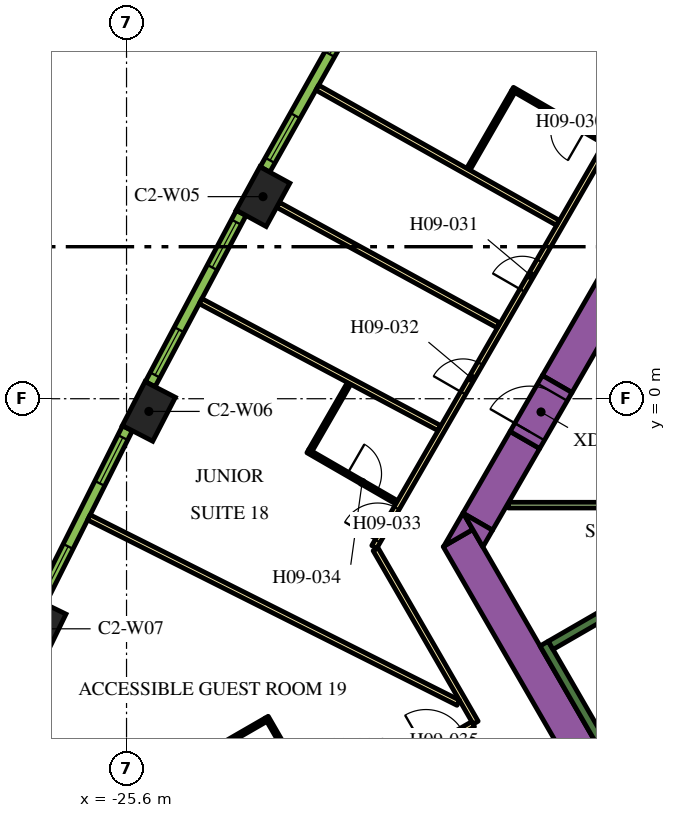
"""IFC4 building model, lengths in metres.
Left out: names, types, materials, properties, quantities, classifications, styles, units other than length and angle.
Written with IfcOpenShell. Run it as: python <this file> out.ifc"""

import sys

from ifc_helpers import new_model, si_unit, direction, frame, frame_2d, origin, origin_2d, place, context, subcontext, project, spatial, polyline, rectangle, outline, extrude, element, fill, save


model = new_model("IFC4")
c1 = context("Model", 3, precision=1e-05, world=origin(), true_north=direction((0.0, 1.0)))
c2 = subcontext(c1, "Body", "Model", "MODEL_VIEW")
j1 = project(units=[si_unit("LENGTHUNIT", "METRE"), si_unit("PLANEANGLEUNIT", "RADIAN")], contexts=[c1])
p1 = place(None, origin())
s1 = spatial("IfcSite", under=j1, at=p1, CompositionType="ELEMENT")
p2 = place(p1, origin())
s2 = spatial("IfcBuilding", under=s1, at=p2, CompositionType="ELEMENT")
p3 = place(p2, frame((0.0, 0.0, 126.6)))
s3 = spatial("IfcBuildingStorey", under=s2, at=p3, CompositionType="ELEMENT", Elevation=126.6)
for number, where, z_axis, x_axis in (
    (1, (-22.009, 5.317, 0.0), (0.0, 0.0, 1.0), (-0.48, -0.877, 0.0)),
    (2, (-25.012, -0.334, 0.0), (0.0, 0.0, 1.0), (-0.459, -0.888, 0.0)),
    (3, (-27.883, -6.054, 0.0), (0.0, 0.0, 1.0), (-0.438, -0.899, 0.0)),
):
    element("IfcColumn", number, at=place(p3, frame(where, z_axis=z_axis, x_axis=x_axis)), inside=s3, PredefinedType="COLUMN", context=c2, shape_type="SweptSolid", body=[
        extrude(rectangle(XDim=1.3, YDim=0.9, at=origin_2d()), origin(), (0.0, 0.0, 1.0), 3.9),
    ])
p4 = place(p3, frame((-14.268, 0.387, 0.0), z_axis=(0.0, 0.0, 1.0), x_axis=(0.499994617707, 0.866028511231, 0.0)))
e4 = element("IfcWall", 4, at=p4, inside=s3, PredefinedType="SOLIDWALL", context=c2, shape_type="SweptSolid", body=[
    extrude(rectangle(XDim=18.817, YDim=0.9, at=frame_2d((9.409, 0.0))), origin(), (0.0, 0.0, 1.0), 3.9),
])
p5 = place(p3, frame((-12.134, -11.883, 0.0), z_axis=(0.0, 0.0, 1.0), x_axis=(-0.500005339912, 0.866022320763, 0.0)))
e5 = element("IfcWall", 5, at=p5, inside=s3, PredefinedType="SOLIDWALL", context=c2, shape_type="SweptSolid", body=[
    extrude(rectangle(XDim=9.488, YDim=0.9, at=frame_2d((4.744, 0.0))), origin(), (0.0, 0.0, 1.0), 3.9),
])
p6 = place(p3, origin())
e6 = element("IfcWall", 6, at=p6, inside=s3, PredefinedType="SOLIDWALL", context=c2, shape_type="SweptSolid", body=[
    extrude(outline(polyline([(-16.489, -3.44), (-17.251, -3.88), (-16.743, -3.0), (-16.489, -3.44)])), origin(), (0.0, 0.0, 1.0), 3.9),
])
p7 = place(p3, frame((-15.118, -1.085, 0.0), z_axis=(0.0, 0.0, 1.0), x_axis=(-0.50006606081, -0.865987260198, 0.0)))
e7 = element("IfcWall", 7, at=p7, inside=s3, PredefinedType="SOLIDWALL", context=c2, shape_type="SweptSolid", body=[
    extrude(rectangle(XDim=2.481, YDim=0.9, at=frame_2d((1.24, 0.0))), origin(), (0.0, 0.0, 1.0), 3.9),
])
e8 = element("IfcWall", 8, at=p6, inside=s3, PredefinedType="SOLIDWALL", context=c2, shape_type="SweptSolid", body=[
    extrude(outline(polyline([(-16.223, -3.9), (-16.732, -3.02), (-15.969, -3.46), (-16.223, -3.9)])), origin(), (0.0, 0.0, 1.0), 3.9),
])
p8 = place(p3, frame((-12.885, -9.431, 0.0), z_axis=(0.0, 0.0, 1.0), x_axis=(-0.500020560727, 0.866013532718, 0.0)))
e9 = element("IfcWall", 9, at=p8, inside=s3, PredefinedType="SOLIDWALL", context=c2, shape_type="SweptSolid", body=[
    extrude(rectangle(XDim=3.45, YDim=0.25, at=frame_2d((1.725, 0.0))), origin(), (0.0, 0.0, 1.0), 3.9),
])
p9 = place(p3, frame((-14.44, -6.49, 0.0), z_axis=(0.0, 0.0, 1.0), x_axis=(0.866022966069, 0.500004222222, 0.0)))
e10 = element("IfcWall", 10, at=p9, inside=s3, PredefinedType="SOLIDWALL", context=c2, shape_type="SweptSolid", body=[
    extrude(rectangle(XDim=6.8, YDim=0.25, at=frame_2d((3.4, 0.0))), origin(), (0.0, 0.0, 1.0), 3.9),
])
p10 = place(p3, frame((-12.915, -2.8, 0.0), z_axis=(0.0, 0.0, 1.0), x_axis=(-1.0, 0.0, 0.0)))
e11 = element("IfcWall", 11, at=p10, inside=s3, PredefinedType="PARTITIONING", context=c2, shape_type="SweptSolid", body=[
    extrude(rectangle(XDim=2.637, YDim=0.15, at=frame_2d((1.318, 0.0))), origin(), (0.0, 0.0, 1.0), 2.75),
])
p11 = place(p3, frame((-15.118, -1.085, 0.0), z_axis=(0.0, 0.0, 1.0), x_axis=(0.500000056704, 0.866025371046, 0.0)))
e12 = element("IfcWall", 12, at=p11, inside=s3, PredefinedType="SOLIDWALL", context=c2, shape_type="SweptSolid", body=[
    extrude(rectangle(XDim=1.7, YDim=0.9, at=frame_2d((0.85, 0.0))), origin(), (0.0, 0.0, 1.0), 3.9),
])
p12 = place(p11, frame((0.25, 0.0, 0.0)))
e13 = element("IfcOpeningElement", 13, at=p12, cuts=e12, PredefinedType="OPENING", context=c2, shape_type="SweptSolid", body=[
    extrude(rectangle(XDim=1.2, YDim=2.1, at=frame_2d((0.6, 1.05))), frame((0.0, 0.46, 0.0), z_axis=(0.0, -1.0, 0.0), x_axis=(1.0, 0.0, 0.0)), (0.0, 0.0, 1.0), 0.92),
])
p13 = place(p3, frame((-19.081, -3.9, 0.0), z_axis=(0.0, 0.0, 1.0), x_axis=(0.499998313975, 0.866026377209, 0.0)))
e14 = element("IfcWall", 14, at=p13, inside=s3, PredefinedType="PARTITIONING", context=c2, shape_type="SweptSolid", body=[
    extrude(rectangle(XDim=25.766, YDim=0.15, at=frame_2d((12.883, 0.0))), origin(), (0.0, 0.0, 1.0), 2.75),
])
p14 = place(p13, frame((19.306, 0.0, 0.0)))
e15 = element("IfcOpeningElement", 15, at=p14, cuts=e14, PredefinedType="OPENING", context=c2, shape_type="SweptSolid", body=[
    extrude(rectangle(XDim=1.0, YDim=2.1, at=frame_2d((0.5, 1.05))), frame((0.0, 0.085, 0.0), z_axis=(0.0, -1.0, 0.0), x_axis=(1.0, 0.0, 0.0)), (0.0, 0.0, 1.0), 0.17),
])
p15 = place(p13, frame((18.0, 0.0, 0.0)))
e16 = element("IfcOpeningElement", 16, at=p15, cuts=e14, PredefinedType="OPENING", context=c2, shape_type="SweptSolid", body=[
    extrude(rectangle(XDim=1.0, YDim=2.1, at=frame_2d((0.5, 1.05))), frame((0.0, 0.085, 0.0), z_axis=(0.0, -1.0, 0.0), x_axis=(1.0, 0.0, 0.0)), (0.0, 0.0, 1.0), 0.17),
])
p16 = place(p13, frame((7.793, 0.0, 0.0)))
e17 = element("IfcOpeningElement", 17, at=p16, cuts=e14, PredefinedType="OPENING", context=c2, shape_type="SweptSolid", body=[
    extrude(rectangle(XDim=0.9, YDim=2.1, at=frame_2d((0.45, 1.05))), frame((0.0, 0.085, 0.0), z_axis=(0.0, -1.0, 0.0), x_axis=(1.0, 0.0, 0.0)), (0.0, 0.0, 1.0), 0.17),
])
p17 = place(p13, frame((4.674, 0.0, 0.0)))
e18 = element("IfcOpeningElement", 18, at=p17, cuts=e14, PredefinedType="OPENING", context=c2, shape_type="SweptSolid", body=[
    extrude(rectangle(XDim=0.9, YDim=2.1, at=frame_2d((0.45, 1.05))), frame((0.0, 0.085, 0.0), z_axis=(0.0, -1.0, 0.0), x_axis=(1.0, 0.0, 0.0)), (0.0, 0.0, 1.0), 0.17),
])
p18 = place(p13, frame((0.18, 0.0, 0.0)))
e19 = element("IfcOpeningElement", 19, at=p18, cuts=e14, PredefinedType="OPENING", context=c2, shape_type="SweptSolid", body=[
    extrude(rectangle(XDim=1.0, YDim=2.1, at=frame_2d((0.5, 1.05))), frame((0.0, 0.085, 0.0), z_axis=(0.0, -1.0, 0.0), x_axis=(1.0, 0.0, 0.0)), (0.0, 0.0, 1.0), 0.17),
])
p19 = place(p3, frame((-16.412, -8.523, 0.0), z_axis=(0.0, 0.0, 1.0), x_axis=(-0.500001929737, 0.866024289647, 0.0)))
e20 = element("IfcWall", 20, at=p19, inside=s3, PredefinedType="PARTITIONING", context=c2, shape_type="SweptSolid", body=[
    extrude(rectangle(XDim=5.268, YDim=0.15, at=frame_2d((2.634, 0.0))), origin(), (0.0, 0.0, 1.0), 2.75),
])
p20 = place(p3, frame((-28.211, -15.335, 0.0), z_axis=(0.0, 0.0, 1.0), x_axis=(0.866025884867, 0.49999916674, 0.0)))
e21 = element("IfcWall", 21, at=p20, inside=s3, PredefinedType="PARTITIONING", context=c2, shape_type="SweptSolid", body=[
    extrude(rectangle(XDim=13.543, YDim=0.15, at=frame_2d((6.772, 0.0))), origin(), (0.0, 0.0, 1.0), 2.75),
])
p21 = place(p20, frame((12.114, 0.0, 0.0)))
e22 = element("IfcOpeningElement", 22, at=p21, cuts=e21, PredefinedType="OPENING", context=c2, shape_type="SweptSolid", body=[
    extrude(rectangle(XDim=1.1, YDim=2.1, at=frame_2d((0.55, 1.05))), frame((0.0, 0.085, 0.0), z_axis=(0.0, -1.0, 0.0), x_axis=(1.0, 0.0, 0.0)), (0.0, 0.0, 1.0), 0.17),
])
p22 = place(p20, frame((4.65, 0.0, 0.0)))
e23 = element("IfcOpeningElement", 23, at=p22, cuts=e21, PredefinedType="OPENING", context=c2, shape_type="SweptSolid", body=[
    extrude(rectangle(XDim=1.0, YDim=2.1, at=frame_2d((0.5, 1.05))), frame((0.0, 0.085, 0.0), z_axis=(0.0, -1.0, 0.0), x_axis=(1.0, 0.0, 0.0)), (0.0, 0.0, 1.0), 0.17),
])
p23 = place(p3, frame((-29.406, -8.901, 0.0), z_axis=(0.0, 0.0, 1.0), x_axis=(0.904002363742, -0.427527456836, 0.0)))
e24 = element("IfcWall", 24, at=p23, inside=s3, PredefinedType="PARTITIONING", context=c2, shape_type="SweptSolid", body=[
    extrude(rectangle(XDim=7.362, YDim=0.15, at=frame_2d((3.681, 0.0))), origin(), (0.0, 0.0, 1.0), 2.75),
])
p24 = place(p3, frame((-23.652, 2.567, 0.0), z_axis=(0.0, 0.0, 1.0), x_axis=(0.883019237957, -0.469336793144, 0.0)))
e25 = element("IfcWall", 25, at=p24, inside=s3, PredefinedType="PARTITIONING", context=c2, shape_type="SweptSolid", body=[
    extrude(rectangle(XDim=7.111, YDim=0.15, at=frame_2d((3.555, 0.0))), origin(), (0.0, 0.0, 1.0), 2.75),
])
p25 = place(p3, frame((-26.591, -3.122, 0.0), z_axis=(0.0, 0.0, 1.0), x_axis=(0.893766213273, -0.448533115847, 0.0)))
e26 = element("IfcWall", 26, at=p25, inside=s3, PredefinedType="PARTITIONING", context=c2, shape_type="SweptSolid", body=[
    extrude(rectangle(XDim=10.875, YDim=0.15, at=frame_2d((5.438, 0.0))), origin(), (0.0, 0.0, 1.0), 2.75),
])
p26 = place(p3, frame((-21.614, 5.102, 0.0), z_axis=(0.0, 0.0, 1.0), x_axis=(0.877484555087, -0.479604895287, 0.0)))
e27 = element("IfcWall", 27, at=p26, inside=s3, PredefinedType="PARTITIONING", context=c2, shape_type="SweptSolid", body=[
    extrude(rectangle(XDim=6.611, YDim=0.15, at=frame_2d((3.306, 0.0))), origin(), (0.0, 0.0, 1.0), 2.75),
])
p27 = place(p3, frame((-20.581, 8.185, 0.0), z_axis=(0.0, 0.0, 1.0), x_axis=(0.871820720803, -0.489825102233, 0.0)))
e28 = element("IfcWall", 28, at=p27, inside=s3, PredefinedType="PARTITIONING", context=c2, shape_type="SweptSolid", body=[
    extrude(rectangle(XDim=7.257, YDim=0.15, at=frame_2d((3.628, 0.0))), origin(), (0.0, 0.0, 1.0), 2.75),
])
p28 = place(p3, frame((-13.019, 6.751, 0.0), z_axis=(0.0, 0.0, 1.0), x_axis=(-0.866034573852, 0.49998411664, 0.0)))
e29 = element("IfcWall", 29, at=p28, inside=s3, PredefinedType="PARTITIONING", context=c2, shape_type="SweptSolid", body=[
    extrude(rectangle(XDim=2.8, YDim=0.1, at=frame_2d((1.4, 0.0))), origin(), (0.0, 0.0, 1.0), 2.75),
])
p29 = place(p28, frame((0.6, 0.0, 0.0)))
e30 = element("IfcOpeningElement", 30, at=p29, cuts=e29, PredefinedType="OPENING", context=c2, shape_type="SweptSolid", body=[
    extrude(rectangle(XDim=0.9, YDim=2.1, at=frame_2d((0.45, 1.05))), frame((0.0, 0.06, 0.0), z_axis=(0.0, -1.0, 0.0), x_axis=(1.0, 0.0, 0.0)), (0.0, 0.0, 1.0), 0.12),
])
p30 = place(p3, frame((-15.425, 8.083, 0.0), z_axis=(0.0, 0.0, 1.0), x_axis=(-0.500032858622, -0.866006432019, 0.0)))
e31 = element("IfcWall", 31, at=p30, inside=s3, PredefinedType="PARTITIONING", context=c2, shape_type="SweptSolid", body=[
    extrude(rectangle(XDim=2.36, YDim=0.1, at=frame_2d((1.18, 0.0))), origin(), (0.0, 0.0, 1.0), 2.75),
])
p31 = place(p3, frame((-20.829, -1.377, 0.0), z_axis=(0.0, 0.0, 1.0), x_axis=(0.866036505625, -0.499980770555, 0.0)))
e32 = element("IfcWall", 32, at=p31, inside=s3, PredefinedType="PARTITIONING", context=c2, shape_type="SweptSolid", body=[
    extrude(rectangle(XDim=2.7, YDim=0.1, at=frame_2d((1.35, 0.0))), origin(), (0.0, 0.0, 1.0), 2.75),
])
p32 = place(p31, frame((1.2, 0.0, 0.0)))
e33 = element("IfcOpeningElement", 33, at=p32, cuts=e32, PredefinedType="OPENING", context=c2, shape_type="SweptSolid", body=[
    extrude(rectangle(XDim=0.9, YDim=2.1, at=frame_2d((0.45, 1.05))), frame((0.0, 0.06, 0.0), z_axis=(0.0, -1.0, 0.0), x_axis=(1.0, 0.0, 0.0)), (0.0, 0.0, 1.0), 0.12),
])
p33 = place(p3, frame((-20.761, -1.359, 0.0), z_axis=(0.0, 0.0, 1.0), x_axis=(0.499954962928, 0.866051404389, 0.0)))
e34 = element("IfcWall", 34, at=p33, inside=s3, PredefinedType="PARTITIONING", context=c2, shape_type="SweptSolid", body=[
    extrude(rectangle(XDim=2.03, YDim=0.1, at=frame_2d((1.015, 0.0))), origin(), (0.0, 0.0, 1.0), 2.75),
])
p34 = place(p3, frame((-20.515, -10.805, 0.0), z_axis=(0.0, 0.0, 1.0), x_axis=(-0.49994636267, 0.866056369097, 0.0)))
e35 = element("IfcWall", 35, at=p34, inside=s3, PredefinedType="PARTITIONING", context=c2, shape_type="SweptSolid", body=[
    extrude(rectangle(XDim=2.8, YDim=0.1, at=frame_2d((1.4, 0.0))), origin(), (0.0, 0.0, 1.0), 2.75),
])
p35 = place(p34, frame((0.55, 0.0, 0.0)))
e36 = element("IfcOpeningElement", 36, at=p35, cuts=e35, PredefinedType="OPENING", context=c2, shape_type="SweptSolid", body=[
    extrude(rectangle(XDim=1.0, YDim=2.1, at=frame_2d((0.5, 1.05))), frame((0.0, 0.06, 0.0), z_axis=(0.0, -1.0, 0.0), x_axis=(1.0, 0.0, 0.0)), (0.0, 0.0, 1.0), 0.12),
])
p36 = place(p3, frame((-21.933, -8.448, 0.0), z_axis=(0.0, 0.0, 1.0), x_axis=(-0.866022959057, -0.500004234368, 0.0)))
e37 = element("IfcWall", 37, at=p36, inside=s3, PredefinedType="PARTITIONING", context=c2, shape_type="SweptSolid", body=[
    extrude(rectangle(XDim=2.5, YDim=0.1, at=frame_2d((1.25, 0.0))), origin(), (0.0, 0.0, 1.0), 2.75),
])
p37 = place(p3, frame((-19.458, 10.48, 0.0), z_axis=(0.0, 0.0, 1.0), x_axis=(-0.48983164787, -0.87181704316, 0.0)))
e38 = element("IfcWall", 38, at=p37, inside=s3, PredefinedType="SOLIDWALL", context=c2, shape_type="SweptSolid", body=[
    extrude(rectangle(XDim=5.1, YDim=0.29, at=frame_2d((2.55, 0.0))), origin(), (0.0, 0.0, 1.0), 3.65),
])
p38 = place(p37, frame((0.272, 0.0, 0.9)))
e39 = element("IfcOpeningElement", 39, at=p38, cuts=e38, PredefinedType="OPENING", context=c2, shape_type="SweptSolid", body=[
    extrude(rectangle(XDim=1.35, YDim=2.15, at=frame_2d((0.675, 1.075))), frame((0.0, 0.155, 0.0), z_axis=(0.0, -1.0, 0.0), x_axis=(1.0, 0.0, 0.0)), (0.0, 0.0, 1.0), 0.31),
])
p39 = place(p37, frame((3.478, 0.0, 0.9)))
e40 = element("IfcOpeningElement", 40, at=p39, cuts=e38, PredefinedType="OPENING", context=c2, shape_type="SweptSolid", body=[
    extrude(rectangle(XDim=1.35, YDim=2.15, at=frame_2d((0.675, 1.075))), frame((0.0, 0.155, 0.0), z_axis=(0.0, -1.0, 0.0), x_axis=(1.0, 0.0, 0.0)), (0.0, 0.0, 1.0), 0.31),
])
p40 = place(p3, frame((-22.583, 4.887, 0.0), z_axis=(0.0, 0.0, 1.0), x_axis=(-0.469323203119, -0.883026461106, 0.0)))
e41 = element("IfcWall", 41, at=p40, inside=s3, PredefinedType="SOLIDWALL", context=c2, shape_type="SweptSolid", body=[
    extrude(rectangle(XDim=5.101, YDim=0.29, at=frame_2d((2.55, 0.0))), origin(), (0.0, 0.0, 1.0), 3.65),
])
p41 = place(p40, frame((0.273, 0.0, 0.9)))
e42 = element("IfcOpeningElement", 42, at=p41, cuts=e41, PredefinedType="OPENING", context=c2, shape_type="SweptSolid", body=[
    extrude(rectangle(XDim=1.35, YDim=2.15, at=frame_2d((0.675, 1.075))), frame((0.0, 0.155, 0.0), z_axis=(0.0, -1.0, 0.0), x_axis=(1.0, 0.0, 0.0)), (0.0, 0.0, 1.0), 0.31),
])
p42 = place(p40, frame((3.478, 0.0, 0.9)))
e43 = element("IfcOpeningElement", 43, at=p42, cuts=e41, PredefinedType="OPENING", context=c2, shape_type="SweptSolid", body=[
    extrude(rectangle(XDim=1.35, YDim=2.15, at=frame_2d((0.675, 1.075))), frame((0.0, 0.155, 0.0), z_axis=(0.0, -1.0, 0.0), x_axis=(1.0, 0.0, 0.0)), (0.0, 0.0, 1.0), 0.31),
])
p43 = place(p3, frame((-25.576, -0.778, 0.0), z_axis=(0.0, 0.0, 1.0), x_axis=(-0.448534297211, -0.893765620409, 0.0)))
e44 = element("IfcWall", 44, at=p43, inside=s3, PredefinedType="SOLIDWALL", context=c2, shape_type="SweptSolid", body=[
    extrude(rectangle(XDim=5.1, YDim=0.29, at=frame_2d((2.55, 0.0))), origin(), (0.0, 0.0, 1.0), 3.65),
])
p44 = place(p43, frame((0.272, 0.0, 0.9)))
e45 = element("IfcOpeningElement", 45, at=p44, cuts=e44, PredefinedType="OPENING", context=c2, shape_type="SweptSolid", body=[
    extrude(rectangle(XDim=1.35, YDim=2.15, at=frame_2d((0.675, 1.075))), frame((0.0, 0.155, 0.0), z_axis=(0.0, -1.0, 0.0), x_axis=(1.0, 0.0, 0.0)), (0.0, 0.0, 1.0), 0.31),
])
p45 = place(p43, frame((3.478, 0.0, 0.9)))
e46 = element("IfcOpeningElement", 46, at=p45, cuts=e44, PredefinedType="OPENING", context=c2, shape_type="SweptSolid", body=[
    extrude(rectangle(XDim=1.35, YDim=2.15, at=frame_2d((0.675, 1.075))), frame((0.0, 0.155, 0.0), z_axis=(0.0, -1.0, 0.0), x_axis=(1.0, 0.0, 0.0)), (0.0, 0.0, 1.0), 0.31),
])
p46 = place(p12, origin())
e47 = element("IfcDoor", 47, at=p46, inside=s3, OperationType="SINGLE_SWING_LEFT", PredefinedType="DOOR", context=c2, shape_type="SweptSolid", body=[
    extrude(rectangle(XDim=1.2, YDim=2.1, at=frame_2d((0.6, 1.05))), frame((0.0, 0.025, 0.0), z_axis=(0.0, -1.0, 0.0), x_axis=(1.0, 0.0, 0.0)), (0.0, 0.0, 1.0), 0.05),
])
fill(e13, e47)
p47 = place(p29, origin())
e48 = element("IfcDoor", 48, at=p47, inside=s3, OperationType="SINGLE_SWING_RIGHT", PredefinedType="DOOR", context=c2, shape_type="SweptSolid", body=[
    extrude(rectangle(XDim=0.9, YDim=2.1, at=frame_2d((0.45, 1.05))), frame((0.0, 0.025, 0.0), z_axis=(0.0, -1.0, 0.0), x_axis=(1.0, 0.0, 0.0)), (0.0, 0.0, 1.0), 0.05),
])
fill(e30, e48)
p48 = place(p16, origin())
e49 = element("IfcDoor", 49, at=p48, inside=s3, OperationType="SINGLE_SWING_RIGHT", PredefinedType="DOOR", context=c2, shape_type="SweptSolid", body=[
    extrude(rectangle(XDim=0.9, YDim=2.1, at=frame_2d((0.45, 1.05))), frame((0.0, 0.025, 0.0), z_axis=(0.0, -1.0, 0.0), x_axis=(1.0, 0.0, 0.0)), (0.0, 0.0, 1.0), 0.05),
])
fill(e17, e49)
p49 = place(p17, origin())
e50 = element("IfcDoor", 50, at=p49, inside=s3, OperationType="SINGLE_SWING_LEFT", PredefinedType="DOOR", context=c2, shape_type="SweptSolid", body=[
    extrude(rectangle(XDim=0.9, YDim=2.1, at=frame_2d((0.45, 1.05))), frame((0.0, 0.025, 0.0), z_axis=(0.0, -1.0, 0.0), x_axis=(1.0, 0.0, 0.0)), (0.0, 0.0, 1.0), 0.05),
])
fill(e18, e50)
p50 = place(p18, origin())
e51 = element("IfcDoor", 51, at=p50, inside=s3, OperationType="SINGLE_SWING_LEFT", PredefinedType="DOOR", context=c2, shape_type="SweptSolid", body=[
    extrude(rectangle(XDim=1.0, YDim=2.1, at=frame_2d((0.5, 1.05))), frame((0.0, 0.025, 0.0), z_axis=(0.0, -1.0, 0.0), x_axis=(1.0, 0.0, 0.0)), (0.0, 0.0, 1.0), 0.05),
])
fill(e19, e51)
p51 = place(p32, origin())
e52 = element("IfcDoor", 52, at=p51, inside=s3, OperationType="SINGLE_SWING_RIGHT", PredefinedType="DOOR", context=c2, shape_type="SweptSolid", body=[
    extrude(rectangle(XDim=0.9, YDim=2.1, at=frame_2d((0.45, 1.05))), frame((0.0, 0.025, 0.0), z_axis=(0.0, -1.0, 0.0), x_axis=(1.0, 0.0, 0.0)), (0.0, 0.0, 1.0), 0.05),
])
fill(e33, e52)
p52 = place(p21, origin())
e53 = element("IfcDoor", 53, at=p52, inside=s3, OperationType="SINGLE_SWING_RIGHT", PredefinedType="DOOR", context=c2, shape_type="SweptSolid", body=[
    extrude(rectangle(XDim=1.1, YDim=2.1, at=frame_2d((0.55, 1.05))), frame((0.0, 0.025, 0.0), z_axis=(0.0, -1.0, 0.0), x_axis=(1.0, 0.0, 0.0)), (0.0, 0.0, 1.0), 0.05),
])
fill(e22, e53)
p53 = place(p38, origin())
e54 = element("IfcWindow", 54, at=p53, inside=s3, PartitioningType="DOUBLE_PANEL_VERTICAL", PredefinedType="WINDOW", context=c2, shape_type="SweptSolid", body=[
    extrude(rectangle(XDim=1.35, YDim=2.15, at=frame_2d((0.675, 1.075))), frame((0.0, 0.015, 0.0), z_axis=(0.0, -1.0, 0.0), x_axis=(1.0, 0.0, 0.0)), (0.0, 0.0, 1.0), 0.06),
])
fill(e39, e54)
p54 = place(p39, origin())
e55 = element("IfcWindow", 55, at=p54, inside=s3, PartitioningType="DOUBLE_PANEL_VERTICAL", PredefinedType="WINDOW", context=c2, shape_type="SweptSolid", body=[
    extrude(rectangle(XDim=1.35, YDim=2.15, at=frame_2d((0.675, 1.075))), frame((0.0, 0.015, 0.0), z_axis=(0.0, -1.0, 0.0), x_axis=(1.0, 0.0, 0.0)), (0.0, 0.0, 1.0), 0.06),
])
fill(e40, e55)
p55 = place(p41, origin())
e56 = element("IfcWindow", 56, at=p55, inside=s3, PartitioningType="DOUBLE_PANEL_VERTICAL", PredefinedType="WINDOW", context=c2, shape_type="SweptSolid", body=[
    extrude(rectangle(XDim=1.35, YDim=2.15, at=frame_2d((0.675, 1.075))), frame((0.0, 0.015, 0.0), z_axis=(0.0, -1.0, 0.0), x_axis=(1.0, 0.0, 0.0)), (0.0, 0.0, 1.0), 0.06),
])
fill(e42, e56)
p56 = place(p42, origin())
e57 = element("IfcWindow", 57, at=p56, inside=s3, PartitioningType="DOUBLE_PANEL_VERTICAL", PredefinedType="WINDOW", context=c2, shape_type="SweptSolid", body=[
    extrude(rectangle(XDim=1.35, YDim=2.15, at=frame_2d((0.675, 1.075))), frame((0.0, 0.015, 0.0), z_axis=(0.0, -1.0, 0.0), x_axis=(1.0, 0.0, 0.0)), (0.0, 0.0, 1.0), 0.06),
])
fill(e43, e57)
p57 = place(p44, origin())
e58 = element("IfcWindow", 58, at=p57, inside=s3, PartitioningType="DOUBLE_PANEL_VERTICAL", PredefinedType="WINDOW", context=c2, shape_type="SweptSolid", body=[
    extrude(rectangle(XDim=1.35, YDim=2.15, at=frame_2d((0.675, 1.075))), frame((0.0, 0.015, 0.0), z_axis=(0.0, -1.0, 0.0), x_axis=(1.0, 0.0, 0.0)), (0.0, 0.0, 1.0), 0.06),
])
fill(e45, e58)
p58 = place(p45, origin())
e59 = element("IfcWindow", 59, at=p58, inside=s3, PartitioningType="DOUBLE_PANEL_VERTICAL", PredefinedType="WINDOW", context=c2, shape_type="SweptSolid", body=[
    extrude(rectangle(XDim=1.35, YDim=2.15, at=frame_2d((0.675, 1.075))), frame((0.0, 0.015, 0.0), z_axis=(0.0, -1.0, 0.0), x_axis=(1.0, 0.0, 0.0)), (0.0, 0.0, 1.0), 0.06),
])
fill(e46, e59)
save(model, sys.argv[1])
